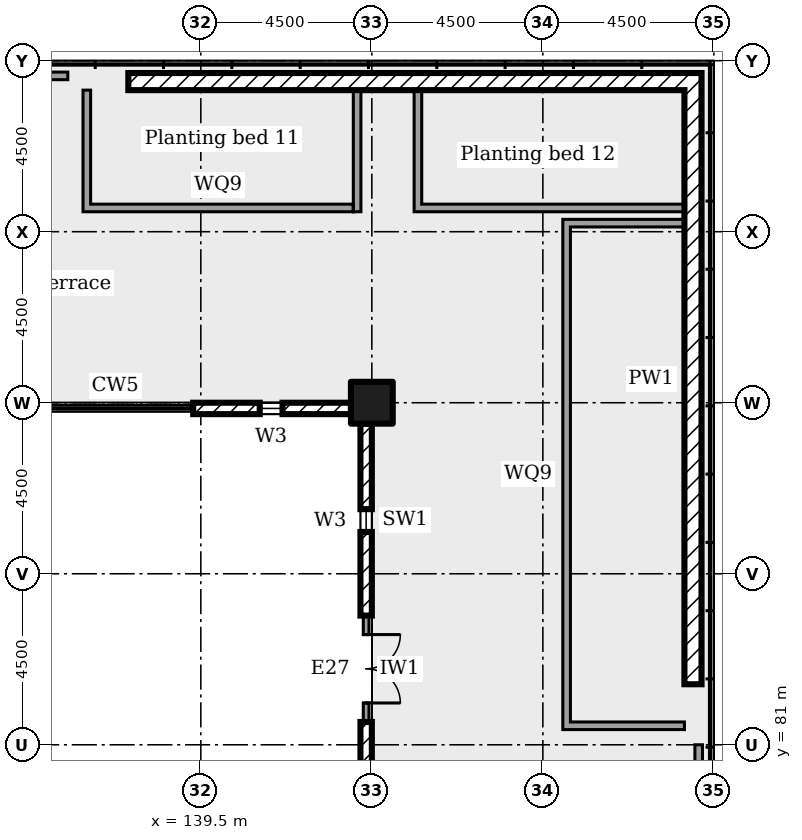
"""IFC4 building model, lengths in metres.
Left out: names, types, materials, properties, quantities, classifications, styles, units other than length and angle.
Written with IfcOpenShell. Run it as: python <this file> out.ifc"""

import sys

from ifc_helpers import new_model, si_unit, direction, frame, frame_2d, origin, origin_2d, place, context, subcontext, project, spatial, rectangle, extrude, element, fill, save


model = new_model("IFC4")
c1 = context("Model", 3, precision=1e-05, world=origin(), true_north=direction((0.0, 1.0)))
c2 = subcontext(c1, "Body", "Model", "MODEL_VIEW")
j1 = project(units=[si_unit("LENGTHUNIT", "METRE"), si_unit("PLANEANGLEUNIT", "RADIAN")], contexts=[c1])
p1 = place(None, origin())
s1 = spatial("IfcSite", under=j1, at=p1, CompositionType="ELEMENT")
p2 = place(p1, origin())
s2 = spatial("IfcBuilding", under=s1, at=p2, CompositionType="ELEMENT")
p3 = place(p2, frame((0.0, 0.0, 6.0)))
s3 = spatial("IfcBuildingStorey", under=s2, at=p3, CompositionType="ELEMENT", Elevation=6.0)
p4 = place(p3, frame((144.0, 90.0, 0.0)))
e1 = element("IfcColumn", 1, at=p4, inside=s3, PredefinedType="COLUMN", context=c2, shape_type="SweptSolid", body=[
    extrude(rectangle(XDim=1.1, YDim=1.1, at=origin_2d()), origin(), (0.0, 0.0, 1.0), 5.5),
])
p5 = place(p3, frame((143.85, 77.05, 0.0), z_axis=(0.0, 0.0, 1.0), x_axis=(0.0, 1.0, 0.0)))
e2 = element("IfcWall", 2, at=p5, inside=s3, PredefinedType="ELEMENTEDWALL", context=c2, shape_type="SweptSolid", body=[
    extrude(rectangle(XDim=4.55, YDim=0.3, at=frame_2d((2.275, 0.0))), origin(), (0.0, 0.0, 1.0), 5.05),
])
p6 = place(p5, frame((2.0, 0.0, 0.45)))
e3 = element("IfcOpeningElement", 3, at=p6, cuts=e2, PredefinedType="OPENING", context=c2, shape_type="SweptSolid", body=[
    extrude(rectangle(XDim=0.6, YDim=2.4, at=frame_2d((0.3, 1.2))), frame((0.0, 0.16, 0.0), z_axis=(0.0, -1.0, 0.0), x_axis=(1.0, 0.0, 0.0)), (0.0, 0.0, 1.0), 0.32),
])
p7 = place(p3, frame((143.85, 81.6, 0.0), z_axis=(0.0, 0.0, 1.0), x_axis=(0.0, 1.0, 0.0)))
e4 = element("IfcWall", 4, at=p7, inside=s3, PredefinedType="SOLIDWALL", context=c2, shape_type="SweptSolid", body=[
    extrude(rectangle(XDim=2.8, YDim=0.15, at=frame_2d((1.4, 0.0))), origin(), (0.0, 0.0, 1.0), 5.05),
])
p8 = place(p7, frame((0.5, 0.0, 0.0)))
e5 = element("IfcOpeningElement", 5, at=p8, cuts=e4, PredefinedType="OPENING", context=c2, shape_type="SweptSolid", body=[
    extrude(rectangle(XDim=1.8, YDim=2.4, at=frame_2d((0.9, 1.2))), frame((0.0, 0.085, 0.0), z_axis=(0.0, -1.0, 0.0), x_axis=(1.0, 0.0, 0.0)), (0.0, 0.0, 1.0), 0.17),
])
p9 = place(p3, frame((143.85, 84.4, 0.0), z_axis=(0.0, 0.0, 1.0), x_axis=(0.0, 1.0, 0.0)))
e6 = element("IfcWall", 6, at=p9, inside=s3, PredefinedType="ELEMENTEDWALL", context=c2, shape_type="SweptSolid", body=[
    extrude(rectangle(XDim=5.05, YDim=0.3, at=frame_2d((2.525, 0.0))), origin(), (0.0, 0.0, 1.0), 5.05),
])
p10 = place(p9, frame((2.2, 0.0, 0.45)))
e7 = element("IfcOpeningElement", 7, at=p10, cuts=e6, PredefinedType="OPENING", context=c2, shape_type="SweptSolid", body=[
    extrude(rectangle(XDim=0.6, YDim=2.4, at=frame_2d((0.3, 1.2))), frame((0.0, 0.16, 0.0), z_axis=(0.0, -1.0, 0.0), x_axis=(1.0, 0.0, 0.0)), (0.0, 0.0, 1.0), 0.32),
])
p11 = place(p3, frame((143.45, 89.85, 0.0), z_axis=(0.0, 0.0, 1.0), x_axis=(-1.0, 0.0, 0.0)))
e8 = element("IfcWall", 8, at=p11, inside=s3, PredefinedType="ELEMENTEDWALL", context=c2, shape_type="SweptSolid", body=[
    extrude(rectangle(XDim=4.15, YDim=0.3, at=frame_2d((2.075, 0.0))), origin(), (0.0, 0.0, 1.0), 5.05),
])
p12 = place(p11, frame((1.8, 0.0, 0.45)))
e9 = element("IfcOpeningElement", 9, at=p12, cuts=e8, PredefinedType="OPENING", context=c2, shape_type="SweptSolid", body=[
    extrude(rectangle(XDim=0.6, YDim=2.4, at=frame_2d((0.3, 1.2))), frame((0.0, 0.16, 0.0), z_axis=(0.0, -1.0, 0.0), x_axis=(1.0, 0.0, 0.0)), (0.0, 0.0, 1.0), 0.32),
])
p13 = place(p3, frame((152.45, 82.593, 0.0), z_axis=(0.0, 0.0, 1.0), x_axis=(0.0, 1.0, 0.0)))
e10 = element("IfcWall", 10, at=p13, inside=s3, PredefinedType="SOLIDWALL", context=c2, shape_type="SweptSolid", body=[
    extrude(rectangle(XDim=16.083, YDim=0.45, at=frame_2d((8.041, 0.0))), origin(), (0.0, 0.0, 1.0), 0.6),
])
p14 = place(p3, frame((152.225, 98.45, 0.0), z_axis=(0.0, 0.0, 1.0), x_axis=(-1.0, 0.0, 0.0)))
e11 = element("IfcWall", 11, at=p14, inside=s3, PredefinedType="SOLIDWALL", context=c2, shape_type="SweptSolid", body=[
    extrude(rectangle(XDim=14.633, YDim=0.45, at=frame_2d((7.316, 0.0))), origin(), (0.0, 0.0, 1.0), 0.6),
])
p15 = place(p3, frame((143.613, 95.025, 0.0), z_axis=(0.0, 0.0, 1.0), x_axis=(0.0, 1.0, 0.0)))
e12 = element("IfcWall", 12, at=p15, inside=s3, PredefinedType="SOLIDWALL", context=c2, shape_type="SweptSolid", body=[
    extrude(rectangle(XDim=3.2, YDim=0.2, at=frame_2d((1.6, 0.0))), origin(), (0.0, 0.0, 1.0), 0.45),
])
p16 = place(p3, frame((136.4, 95.125, 0.0)))
e13 = element("IfcWall", 13, at=p16, inside=s3, PredefinedType="SOLIDWALL", context=c2, shape_type="SweptSolid", body=[
    extrude(rectangle(XDim=7.113, YDim=0.2, at=frame_2d((3.556, 0.0))), origin(), (0.0, 0.0, 1.0), 0.45),
])
p17 = place(p3, frame((136.5, 95.225, 0.0), z_axis=(0.0, 0.0, 1.0), x_axis=(0.0, 1.0, 0.0)))
e14 = element("IfcWall", 14, at=p17, inside=s3, PredefinedType="SOLIDWALL", context=c2, shape_type="SweptSolid", body=[
    extrude(rectangle(XDim=3.0, YDim=0.2, at=frame_2d((1.5, 0.0))), origin(), (0.0, 0.0, 1.0), 0.45),
])
p18 = place(p3, frame((145.113, 95.125, 0.0)))
e15 = element("IfcWall", 15, at=p18, inside=s3, PredefinedType="SOLIDWALL", context=c2, shape_type="SweptSolid", body=[
    extrude(rectangle(XDim=7.113, YDim=0.2, at=frame_2d((3.556, 0.0))), origin(), (0.0, 0.0, 1.0), 0.45),
])
p19 = place(p3, frame((145.212, 95.225, 0.0), z_axis=(0.0, 0.0, 1.0), x_axis=(0.0, 1.0, 0.0)))
e16 = element("IfcWall", 16, at=p19, inside=s3, PredefinedType="SOLIDWALL", context=c2, shape_type="SweptSolid", body=[
    extrude(rectangle(XDim=3.0, YDim=0.2, at=frame_2d((1.5, 0.0))), origin(), (0.0, 0.0, 1.0), 0.45),
])
for number, where in (
    (17, (149.025, 94.725, 0.0)),
    (18, (149.025, 81.5, 0.0)),
):
    element("IfcWall", number, at=place(p3, frame(where)), inside=s3, PredefinedType="SOLIDWALL", context=c2, shape_type="SweptSolid", body=[
        extrude(rectangle(XDim=3.2, YDim=0.2, at=frame_2d((1.6, 0.0))), origin(), (0.0, 0.0, 1.0), 0.45),
    ])
p20 = place(p3, frame((149.125, 81.6, 0.0), z_axis=(0.0, 0.0, 1.0), x_axis=(0.0, 1.0, 0.0)))
e19 = element("IfcWall", 19, at=p20, inside=s3, PredefinedType="SOLIDWALL", context=c2, shape_type="SweptSolid", body=[
    extrude(rectangle(XDim=13.025, YDim=0.2, at=frame_2d((6.512, 0.0))), origin(), (0.0, 0.0, 1.0), 0.45),
])
p21 = place(p3, frame((152.6, 77.2, 0.0), z_axis=(0.0, 0.0, 1.0), x_axis=(0.0, 1.0, 0.0)))
e20 = element("IfcWall", 20, at=p21, inside=s3, PredefinedType="SOLIDWALL", context=c2, shape_type="SweptSolid", body=[
    extrude(rectangle(XDim=3.8, YDim=0.2, at=frame_2d((1.9, 0.0))), origin(), (0.0, 0.0, 1.0), 2.3),
])
p22 = place(p21, frame((0.6, 0.0, 0.0)))
e21 = element("IfcOpeningElement", 21, at=p22, cuts=e20, PredefinedType="OPENING", context=c2, shape_type="SweptSolid", body=[
    extrude(rectangle(XDim=2.6, YDim=2.1, at=frame_2d((1.3, 1.05))), frame((0.0, 0.11, 0.0), z_axis=(0.0, -1.0, 0.0), x_axis=(1.0, 0.0, 0.0)), (0.0, 0.0, 1.0), 0.22),
])
p23 = place(p3, frame((132.2, 98.6, 0.0)))
e22 = element("IfcWall", 22, at=p23, inside=s3, PredefinedType="SOLIDWALL", context=c2, shape_type="SweptSolid", body=[
    extrude(rectangle(XDim=3.8, YDim=0.2, at=frame_2d((1.9, 0.0))), origin(), (0.0, 0.0, 1.0), 2.3),
])
p24 = place(p23, frame((0.6, 0.0, 0.0)))
e23 = element("IfcOpeningElement", 23, at=p24, cuts=e22, PredefinedType="OPENING", context=c2, shape_type="SweptSolid", body=[
    extrude(rectangle(XDim=2.6, YDim=2.1, at=frame_2d((1.3, 1.05))), frame((0.0, 0.11, 0.0), z_axis=(0.0, -1.0, 0.0), x_axis=(1.0, 0.0, 0.0)), (0.0, 0.0, 1.0), 0.22),
])
p25 = place(p8, frame((1.8, 0.0, 0.0), x_axis=(-1.0, 0.0, 0.0)))
e24 = element("IfcDoor", 24, at=p25, inside=s3, OperationType="DOUBLE_DOOR_DOUBLE_SWING", PredefinedType="NOTDEFINED", context=c2, shape_type="SweptSolid", body=[
    extrude(rectangle(XDim=1.8, YDim=2.4, at=frame_2d((0.9, 1.2))), frame((0.0, 0.025, 0.0), z_axis=(0.0, -1.0, 0.0), x_axis=(1.0, 0.0, 0.0)), (0.0, 0.0, 1.0), 0.05),
])
fill(e5, e24)
p26 = place(p10, origin())
e25 = element("IfcWindow", 25, at=p26, inside=s3, PartitioningType="SINGLE_PANEL", PredefinedType="WINDOW", context=c2, shape_type="SweptSolid", body=[
    extrude(rectangle(XDim=0.6, YDim=2.4, at=frame_2d((0.3, 1.2))), frame((0.0, 0.03, 0.0), z_axis=(0.0, -1.0, 0.0), x_axis=(1.0, 0.0, 0.0)), (0.0, 0.0, 1.0), 0.06),
])
fill(e7, e25)
p27 = place(p12, origin())
e26 = element("IfcWindow", 26, at=p27, inside=s3, PartitioningType="SINGLE_PANEL", PredefinedType="WINDOW", context=c2, shape_type="SweptSolid", body=[
    extrude(rectangle(XDim=0.6, YDim=2.4, at=frame_2d((0.3, 1.2))), frame((0.0, 0.03, 0.0), z_axis=(0.0, -1.0, 0.0), x_axis=(1.0, 0.0, 0.0)), (0.0, 0.0, 1.0), 0.06),
])
fill(e9, e26)
save(model, sys.argv[1])
